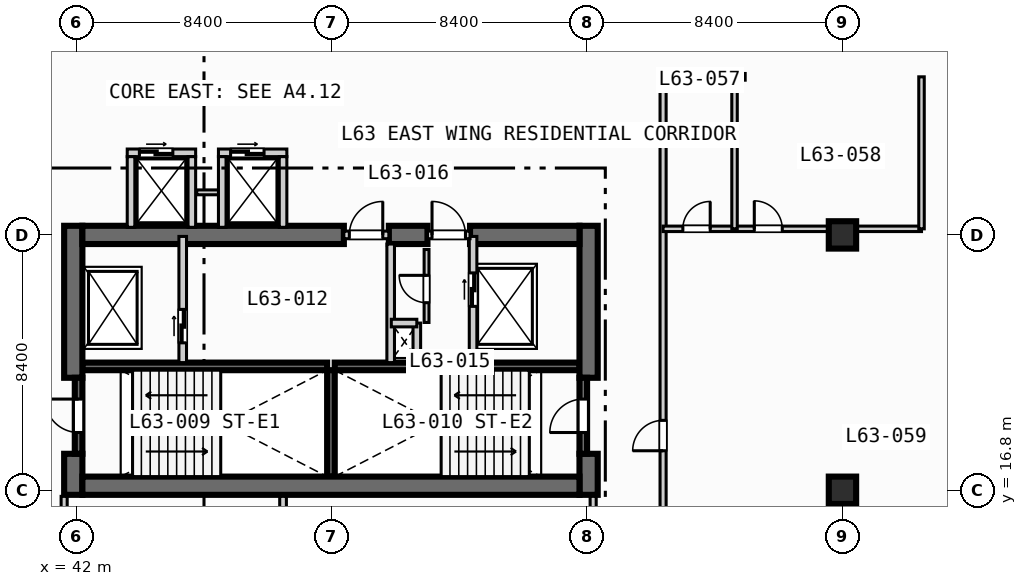
"""IFC4 building model, lengths in metres.
Left out: names, types, materials, properties, quantities, classifications, styles, units other than length and angle.
Written with IfcOpenShell. Run it as: python <this file> out.ifc"""

import sys

from ifc_helpers import new_model, si_unit, direction, frame, frame_2d, origin, origin_2d, place, context, subcontext, project, spatial, rectangle, extrude, element, fill, save


model = new_model("IFC4")
c1 = context("Model", 3, precision=1e-05, world=origin(), true_north=direction((0.0, 1.0)))
c2 = subcontext(c1, "Body", "Model", "MODEL_VIEW")
j1 = project(units=[si_unit("LENGTHUNIT", "METRE"), si_unit("PLANEANGLEUNIT", "RADIAN")], contexts=[c1])
p1 = place(None, origin())
s1 = spatial("IfcSite", under=j1, at=p1, CompositionType="ELEMENT")
p2 = place(p1, origin())
s2 = spatial("IfcBuilding", under=s1, at=p2, CompositionType="ELEMENT")
p3 = place(p2, frame((0.0, 0.0, 256.4)))
s3 = spatial("IfcBuildingStorey", under=s2, at=p3, CompositionType="ELEMENT", Elevation=256.4)
for number, where, z_axis, x_axis in (
    (1, (42.2, 20.875, 0.0), (0.0, 0.0, 1.0), (1.0, 0.0, 0.0)),
    (2, (50.5, 20.875, 0.0), (0.0, 0.0, 1.0), (1.0, 0.0, 0.0)),
):
    element("IfcWall", number, at=place(p3, frame(where, z_axis=z_axis, x_axis=x_axis)), inside=s3, PredefinedType="SOLIDWALL", context=c2, shape_type="SweptSolid", body=[
        extrude(rectangle(XDim=8.05, YDim=0.25, at=frame_2d((4.025, 0.0))), origin(), (0.0, 0.0, 1.0), 3.47),
    ])
p4 = place(p3, frame((50.375, 17.25, 0.0), z_axis=(0.0, 0.0, 1.0), x_axis=(0.0, 1.0, 0.0)))
e3 = element("IfcWall", 3, at=p4, inside=s3, PredefinedType="SOLIDWALL", context=c2, shape_type="SweptSolid", body=[
    extrude(rectangle(XDim=3.5, YDim=0.25, at=frame_2d((1.75, 0.0))), origin(), (0.0, 0.0, 1.0), 3.47),
])
p5 = place(p3, frame((41.9, 16.65, 0.0), z_axis=(0.0, 0.0, 1.0), x_axis=(0.0, 1.0, 0.0)))
e4 = element("IfcWall", 4, at=p5, inside=s3, PredefinedType="SHEAR", context=c2, shape_type="SweptSolid", body=[
    extrude(rectangle(XDim=1.35, YDim=0.6, at=frame_2d((0.675, 0.0))), origin(), (0.0, 0.0, 1.0), 3.47),
])
p6 = place(p3, frame((41.9, 20.5, 0.0), z_axis=(0.0, 0.0, 1.0), x_axis=(0.0, 1.0, 0.0)))
e5 = element("IfcWall", 5, at=p6, inside=s3, PredefinedType="SHEAR", context=c2, shape_type="SweptSolid", body=[
    extrude(rectangle(XDim=5.0, YDim=0.6, at=frame_2d((2.5, 0.0))), origin(), (0.0, 0.0, 1.0), 3.47),
])
p7 = place(p3, frame((58.85, 16.65, 0.0), z_axis=(0.0, 0.0, 1.0), x_axis=(0.0, 1.0, 0.0)))
e6 = element("IfcWall", 6, at=p7, inside=s3, PredefinedType="SHEAR", context=c2, shape_type="SweptSolid", body=[
    extrude(rectangle(XDim=1.35, YDim=0.6, at=frame_2d((0.675, 0.0))), origin(), (0.0, 0.0, 1.0), 3.47),
])
p8 = place(p3, frame((58.85, 20.5, 0.0), z_axis=(0.0, 0.0, 1.0), x_axis=(0.0, 1.0, 0.0)))
e7 = element("IfcWall", 7, at=p8, inside=s3, PredefinedType="SHEAR", context=c2, shape_type="SweptSolid", body=[
    extrude(rectangle(XDim=5.0, YDim=0.6, at=frame_2d((2.5, 0.0))), origin(), (0.0, 0.0, 1.0), 3.47),
])
p9 = place(p3, frame((42.2, 16.95, 0.0), z_axis=(0.0, 0.0, 1.0), x_axis=(1.0, 0.0, 0.0)))
e8 = element("IfcWall", 8, at=p9, inside=s3, PredefinedType="SHEAR", context=c2, shape_type="SweptSolid", body=[
    extrude(rectangle(XDim=16.35, YDim=0.6, at=frame_2d((8.175, 0.0))), origin(), (0.0, 0.0, 1.0), 3.47),
])
p10 = place(p3, frame((42.2, 25.2, 0.0), z_axis=(0.0, 0.0, 1.0), x_axis=(1.0, 0.0, 0.0)))
e9 = element("IfcWall", 9, at=p10, inside=s3, PredefinedType="SHEAR", context=c2, shape_type="SweptSolid", body=[
    extrude(rectangle(XDim=8.6, YDim=0.6, at=frame_2d((4.3, 0.0))), origin(), (0.0, 0.0, 1.0), 3.47),
])
p11 = place(p3, frame((52.28, 25.2, 0.0), z_axis=(0.0, 0.0, 1.0), x_axis=(1.0, 0.0, 0.0)))
e10 = element("IfcWall", 10, at=p11, inside=s3, PredefinedType="SHEAR", context=c2, shape_type="SweptSolid", body=[
    extrude(rectangle(XDim=1.27, YDim=0.6, at=frame_2d((0.635, 0.0))), origin(), (0.0, 0.0, 1.0), 3.47),
])
p12 = place(p3, frame((54.95, 25.2, 0.0), z_axis=(0.0, 0.0, 1.0), x_axis=(1.0, 0.0, 0.0)))
e11 = element("IfcWall", 11, at=p12, inside=s3, PredefinedType="SHEAR", context=c2, shape_type="SweptSolid", body=[
    extrude(rectangle(XDim=3.6, YDim=0.6, at=frame_2d((1.8, 0.0))), origin(), (0.0, 0.0, 1.0), 3.47),
])
for number, where, z_axis, x_axis in (
    (12, (67.2, 16.8, 0.0), (0.0, 0.0, 1.0), (1.0, 0.0, 0.0)),
    (13, (67.2, 25.2, 0.0), (0.0, 0.0, 1.0), (1.0, 0.0, 0.0)),
):
    element("IfcColumn", number, at=place(p3, frame(where, z_axis=z_axis, x_axis=x_axis)), inside=s3, PredefinedType="COLUMN", context=c2, shape_type="SweptSolid", body=[
        extrude(rectangle(XDim=0.9, YDim=0.9, at=origin_2d()), origin(), (0.0, 0.0, 1.0), 3.7),
    ])
p13 = place(p3, frame((42.075, 18.0, 0.0), z_axis=(0.0, 0.0, 1.0), x_axis=(0.0, 1.0, 0.0)))
e14 = element("IfcWall", 14, at=p13, inside=s3, PredefinedType="SOLIDWALL", context=c2, shape_type="SweptSolid", body=[
    extrude(rectangle(XDim=2.5, YDim=0.25, at=frame_2d((1.25, 0.0))), origin(), (0.0, 0.0, 1.0), 3.47),
])
p14 = place(p13, frame((0.7, 0.0, 0.0)))
e15 = element("IfcOpeningElement", 15, at=p14, cuts=e14, PredefinedType="OPENING", context=c2, shape_type="SweptSolid", body=[
    extrude(rectangle(XDim=1.1, YDim=2.15, at=frame_2d((0.55, 1.075))), frame((0.0, 0.135, 0.0), z_axis=(0.0, -1.0, 0.0), x_axis=(1.0, 0.0, 0.0)), (0.0, 0.0, 1.0), 0.27),
])
p15 = place(p3, frame((58.675, 18.0, 0.0), z_axis=(0.0, 0.0, 1.0), x_axis=(0.0, 1.0, 0.0)))
e16 = element("IfcWall", 16, at=p15, inside=s3, PredefinedType="SOLIDWALL", context=c2, shape_type="SweptSolid", body=[
    extrude(rectangle(XDim=2.5, YDim=0.25, at=frame_2d((1.25, 0.0))), origin(), (0.0, 0.0, 1.0), 3.47),
])
p16 = place(p15, frame((0.7, 0.0, 0.0)))
e17 = element("IfcOpeningElement", 17, at=p16, cuts=e16, PredefinedType="OPENING", context=c2, shape_type="SweptSolid", body=[
    extrude(rectangle(XDim=1.1, YDim=2.15, at=frame_2d((0.55, 1.075))), frame((0.0, 0.135, 0.0), z_axis=(0.0, -1.0, 0.0), x_axis=(1.0, 0.0, 0.0)), (0.0, 0.0, 1.0), 0.27),
])
p17 = place(p3, frame((45.5, 21.0, 0.0), z_axis=(0.0, 0.0, 1.0), x_axis=(0.0, 1.0, 0.0)))
e18 = element("IfcWall", 18, at=p17, inside=s3, PredefinedType="SOLIDWALL", context=c2, shape_type="SweptSolid", body=[
    extrude(rectangle(XDim=4.15, YDim=0.25, at=frame_2d((2.075, 0.0))), origin(), (0.0, 0.0, 1.0), 3.47),
])
p18 = place(p17, frame((0.65, 0.0, 0.0)))
e19 = element("IfcOpeningElement", 19, at=p18, cuts=e18, PredefinedType="OPENING", context=c2, shape_type="SweptSolid", body=[
    extrude(rectangle(XDim=1.1, YDim=2.15, at=frame_2d((0.55, 1.075))), frame((0.0, 0.135, 0.0), z_axis=(0.0, -1.0, 0.0), x_axis=(1.0, 0.0, 0.0)), (0.0, 0.0, 1.0), 0.27),
])
p19 = place(p3, frame((50.8, 25.2, 0.0), z_axis=(0.0, 0.0, 1.0), x_axis=(1.0, 0.0, 0.0)))
e20 = element("IfcWall", 20, at=p19, inside=s3, PredefinedType="SOLIDWALL", context=c2, shape_type="SweptSolid", body=[
    extrude(rectangle(XDim=1.48, YDim=0.25, at=frame_2d((0.74, 0.0))), origin(), (0.0, 0.0, 1.0), 3.47),
])
p20 = place(p19, frame((0.18, 0.0, 0.0)))
e21 = element("IfcOpeningElement", 21, at=p20, cuts=e20, PredefinedType="OPENING", context=c2, shape_type="SweptSolid", body=[
    extrude(rectangle(XDim=1.1, YDim=2.15, at=frame_2d((0.55, 1.075))), frame((0.0, 0.135, 0.0), z_axis=(0.0, -1.0, 0.0), x_axis=(1.0, 0.0, 0.0)), (0.0, 0.0, 1.0), 0.27),
])
p21 = place(p3, frame((52.34, 21.0, 0.0), z_axis=(0.0, 0.0, 1.0), x_axis=(0.0, 1.0, 0.0)))
e22 = element("IfcWall", 22, at=p21, inside=s3, PredefinedType="SOLIDWALL", context=c2, shape_type="SweptSolid", body=[
    extrude(rectangle(XDim=3.9, YDim=0.25, at=frame_2d((1.95, 0.0))), origin(), (0.0, 0.0, 1.0), 3.47),
])
p22 = place(p3, frame((55.05, 21.0, 0.0), z_axis=(0.0, 0.0, 1.0), x_axis=(0.0, 1.0, 0.0)))
e23 = element("IfcWall", 23, at=p22, inside=s3, PredefinedType="SOLIDWALL", context=c2, shape_type="SweptSolid", body=[
    extrude(rectangle(XDim=4.15, YDim=0.25, at=frame_2d((2.075, 0.0))), origin(), (0.0, 0.0, 1.0), 3.47),
])
p23 = place(p22, frame((1.85, 0.0, 0.0)))
e24 = element("IfcOpeningElement", 24, at=p23, cuts=e23, PredefinedType="OPENING", context=c2, shape_type="SweptSolid", body=[
    extrude(rectangle(XDim=1.1, YDim=2.15, at=frame_2d((0.55, 1.075))), frame((0.0, 0.135, 0.0), z_axis=(0.0, -1.0, 0.0), x_axis=(1.0, 0.0, 0.0)), (0.0, 0.0, 1.0), 0.27),
])
p24 = place(p3, frame((53.55, 25.2, 0.0), z_axis=(0.0, 0.0, 1.0), x_axis=(1.0, 0.0, 0.0)))
e25 = element("IfcWall", 25, at=p24, inside=s3, PredefinedType="SOLIDWALL", context=c2, shape_type="SweptSolid", body=[
    extrude(rectangle(XDim=1.4, YDim=0.25, at=frame_2d((0.7, 0.0))), origin(), (0.0, 0.0, 1.0), 3.47),
])
p25 = place(p24, frame((0.15, 0.0, 0.0)))
e26 = element("IfcOpeningElement", 26, at=p25, cuts=e25, PredefinedType="OPENING", context=c2, shape_type="SweptSolid", body=[
    extrude(rectangle(XDim=1.1, YDim=2.15, at=frame_2d((0.55, 1.075))), frame((0.0, 0.135, 0.0), z_axis=(0.0, -1.0, 0.0), x_axis=(1.0, 0.0, 0.0)), (0.0, 0.0, 1.0), 0.27),
])
p26 = place(p3, frame((53.2, 21.0, 0.0), z_axis=(0.0, 0.0, 1.0), x_axis=(0.0, 1.0, 0.0)))
e27 = element("IfcWall", 27, at=p26, inside=s3, PredefinedType="SOLIDWALL", context=c2, shape_type="SweptSolid", body=[
    extrude(rectangle(XDim=1.3, YDim=0.25, at=frame_2d((0.65, 0.0))), origin(), (0.0, 0.0, 1.0), 3.47),
])
p27 = place(p3, frame((52.36, 22.3, 0.0), z_axis=(0.0, 0.0, 1.0), x_axis=(1.0, 0.0, 0.0)))
e28 = element("IfcWall", 28, at=p27, inside=s3, PredefinedType="SOLIDWALL", context=c2, shape_type="SweptSolid", body=[
    extrude(rectangle(XDim=0.84, YDim=0.25, at=frame_2d((0.42, 0.0))), origin(), (0.0, 0.0, 1.0), 3.47),
])
p28 = place(p3, frame((53.52, 22.32, 0.0), z_axis=(0.0, 0.0, 1.0), x_axis=(0.0, 1.0, 0.0)))
e29 = element("IfcWall", 29, at=p28, inside=s3, PredefinedType="PARTITIONING", context=c2, shape_type="SweptSolid", body=[
    extrude(rectangle(XDim=2.4, YDim=0.16, at=frame_2d((1.2, 0.0))), origin(), (0.0, 0.0, 1.0), 3.47),
])
p29 = place(p28, frame((0.65, 0.0, 0.0)))
e30 = element("IfcOpeningElement", 30, at=p29, cuts=e29, PredefinedType="OPENING", context=c2, shape_type="SweptSolid", body=[
    extrude(rectangle(XDim=0.9, YDim=2.1, at=frame_2d((0.45, 1.05))), frame((0.0, 0.09, 0.0), z_axis=(0.0, -1.0, 0.0), x_axis=(1.0, 0.0, 0.0)), (0.0, 0.0, 1.0), 0.18),
])
p30 = place(p3, frame((43.675, 27.9, 0.0), z_axis=(0.0, 0.0, 1.0), x_axis=(1.0, 0.0, 0.0)))
e31 = element("IfcWall", 31, at=p30, inside=s3, PredefinedType="SOLIDWALL", context=c2, shape_type="SweptSolid", body=[
    extrude(rectangle(XDim=2.25, YDim=0.25, at=frame_2d((1.125, 0.0))), origin(), (0.0, 0.0, 1.0), 3.47),
])
p31 = place(p30, frame((0.4, 0.0, 0.0)))
e32 = element("IfcOpeningElement", 32, at=p31, cuts=e31, PredefinedType="OPENING", context=c2, shape_type="SweptSolid", body=[
    extrude(rectangle(XDim=1.1, YDim=2.15, at=frame_2d((0.55, 1.075))), frame((0.0, 0.135, 0.0), z_axis=(0.0, -1.0, 0.0), x_axis=(1.0, 0.0, 0.0)), (0.0, 0.0, 1.0), 0.27),
])
for number, where, z_axis, x_axis in (
    (33, (43.8, 25.45, 0.0), (0.0, 0.0, 1.0), (0.0, 1.0, 0.0)),
    (34, (45.8, 25.45, 0.0), (0.0, 0.0, 1.0), (0.0, 1.0, 0.0)),
):
    element("IfcWall", number, at=place(p3, frame(where, z_axis=z_axis, x_axis=x_axis)), inside=s3, PredefinedType="SOLIDWALL", context=c2, shape_type="SweptSolid", body=[
        extrude(rectangle(XDim=2.325, YDim=0.25, at=frame_2d((1.163, 0.0))), origin(), (0.0, 0.0, 1.0), 3.47),
    ])
p32 = place(p3, frame((45.96, 26.6, 0.0), z_axis=(0.0, 0.0, 1.0), x_axis=(1.0, 0.0, 0.0)))
e35 = element("IfcWall", 35, at=p32, inside=s3, PredefinedType="PARTITIONING", context=c2, shape_type="SweptSolid", body=[
    extrude(rectangle(XDim=0.88, YDim=0.16, at=frame_2d((0.44, 0.0))), origin(), (0.0, 0.0, 1.0), 3.47),
])
p33 = place(p3, frame((46.675, 27.9, 0.0), z_axis=(0.0, 0.0, 1.0), x_axis=(1.0, 0.0, 0.0)))
e36 = element("IfcWall", 36, at=p33, inside=s3, PredefinedType="SOLIDWALL", context=c2, shape_type="SweptSolid", body=[
    extrude(rectangle(XDim=2.25, YDim=0.25, at=frame_2d((1.125, 0.0))), origin(), (0.0, 0.0, 1.0), 3.47),
])
p34 = place(p33, frame((0.4, 0.0, 0.0)))
e37 = element("IfcOpeningElement", 37, at=p34, cuts=e36, PredefinedType="OPENING", context=c2, shape_type="SweptSolid", body=[
    extrude(rectangle(XDim=1.1, YDim=2.15, at=frame_2d((0.55, 1.075))), frame((0.0, 0.135, 0.0), z_axis=(0.0, -1.0, 0.0), x_axis=(1.0, 0.0, 0.0)), (0.0, 0.0, 1.0), 0.27),
])
for number, where, z_axis, x_axis in (
    (38, (46.8, 25.45, 0.0), (0.0, 0.0, 1.0), (0.0, 1.0, 0.0)),
    (39, (48.8, 25.45, 0.0), (0.0, 0.0, 1.0), (0.0, 1.0, 0.0)),
):
    element("IfcWall", number, at=place(p3, frame(where, z_axis=z_axis, x_axis=x_axis)), inside=s3, PredefinedType="SOLIDWALL", context=c2, shape_type="SweptSolid", body=[
        extrude(rectangle(XDim=2.325, YDim=0.25, at=frame_2d((1.163, 0.0))), origin(), (0.0, 0.0, 1.0), 3.47),
    ])
p35 = place(p3, frame((41.6, 8.65, 0.0), z_axis=(0.0, 0.0, 1.0), x_axis=(0.0, 1.0, 0.0)))
e40 = element("IfcWall", 40, at=p35, inside=s3, PredefinedType="PARTITIONING", context=c2, shape_type="SweptSolid", body=[
    extrude(rectangle(XDim=7.95, YDim=0.2, at=frame_2d((3.975, 0.0))), origin(), (0.0, 0.0, 1.0), 3.47),
])
p36 = place(p35, frame((2.2, 0.0, 0.0)))
e41 = element("IfcOpeningElement", 41, at=p36, cuts=e40, PredefinedType="OPENING", context=c2, shape_type="SweptSolid", body=[
    extrude(rectangle(XDim=0.92, YDim=2.1, at=frame_2d((0.46, 1.05))), frame((0.0, 0.11, 0.0), z_axis=(0.0, -1.0, 0.0), x_axis=(1.0, 0.0, 0.0)), (0.0, 0.0, 1.0), 0.22),
])
p37 = place(p3, frame((59.0, 8.65, 0.0), z_axis=(0.0, 0.0, 1.0), x_axis=(0.0, 1.0, 0.0)))
e42 = element("IfcWall", 42, at=p37, inside=s3, PredefinedType="PARTITIONING", context=c2, shape_type="SweptSolid", body=[
    extrude(rectangle(XDim=7.95, YDim=0.2, at=frame_2d((3.975, 0.0))), origin(), (0.0, 0.0, 1.0), 2.82),
])
p38 = place(p37, frame((2.2, 0.0, 0.0)))
e43 = element("IfcOpeningElement", 43, at=p38, cuts=e42, PredefinedType="OPENING", context=c2, shape_type="SweptSolid", body=[
    extrude(rectangle(XDim=0.92, YDim=2.1, at=frame_2d((0.46, 1.05))), frame((0.0, 0.11, 0.0), z_axis=(0.0, -1.0, 0.0), x_axis=(1.0, 0.0, 0.0)), (0.0, 0.0, 1.0), 0.22),
])
p39 = place(p3, frame((48.8, 8.65, 0.0), z_axis=(0.0, 0.0, 1.0), x_axis=(0.0, 1.0, 0.0)))
e44 = element("IfcWall", 44, at=p39, inside=s3, PredefinedType="PARTITIONING", context=c2, shape_type="SweptSolid", body=[
    extrude(rectangle(XDim=7.95, YDim=0.22, at=frame_2d((3.975, 0.0))), origin(), (0.0, 0.0, 1.0), 3.47),
])
p40 = place(p3, frame((61.3, 11.6, 0.0), z_axis=(0.0, 0.0, 1.0), x_axis=(0.0, 1.0, 0.0)))
e45 = element("IfcWall", 45, at=p40, inside=s3, PredefinedType="PARTITIONING", context=c2, shape_type="SweptSolid", body=[
    extrude(rectangle(XDim=18.8, YDim=0.2, at=frame_2d((9.4, 0.0))), origin(), (0.0, 0.0, 1.0), 3.47),
])
p41 = place(p40, frame((6.5, 0.0, 0.0)))
e46 = element("IfcOpeningElement", 46, at=p41, cuts=e45, PredefinedType="OPENING", context=c2, shape_type="SweptSolid", body=[
    extrude(rectangle(XDim=1.0, YDim=2.15, at=frame_2d((0.5, 1.075))), frame((0.0, 0.11, 0.0), z_axis=(0.0, -1.0, 0.0), x_axis=(1.0, 0.0, 0.0)), (0.0, 0.0, 1.0), 0.22),
])
p42 = place(p3, frame((61.3, 25.4, 0.0), z_axis=(0.0, 0.0, 1.0), x_axis=(1.0, 0.0, 0.0)))
e47 = element("IfcWall", 47, at=p42, inside=s3, PredefinedType="PLUMBINGWALL", context=c2, shape_type="SweptSolid", body=[
    extrude(rectangle(XDim=8.5, YDim=0.18, at=frame_2d((4.25, 0.0))), origin(), (0.0, 0.0, 1.0), 2.82),
])
p43 = place(p42, frame((0.65, 0.0, 0.0)))
e48 = element("IfcOpeningElement", 48, at=p43, cuts=e47, PredefinedType="OPENING", context=c2, shape_type="SweptSolid", body=[
    extrude(rectangle(XDim=0.9, YDim=2.1, at=frame_2d((0.45, 1.05))), frame((0.0, 0.1, 0.0), z_axis=(0.0, -1.0, 0.0), x_axis=(1.0, 0.0, 0.0)), (0.0, 0.0, 1.0), 0.2),
])
p44 = place(p42, frame((3.0, 0.0, 0.0)))
e49 = element("IfcOpeningElement", 49, at=p44, cuts=e47, PredefinedType="OPENING", context=c2, shape_type="SweptSolid", body=[
    extrude(rectangle(XDim=0.92, YDim=2.1, at=frame_2d((0.46, 1.05))), frame((0.0, 0.1, 0.0), z_axis=(0.0, -1.0, 0.0), x_axis=(1.0, 0.0, 0.0)), (0.0, 0.0, 1.0), 0.2),
])
for number, where, z_axis, x_axis in (
    (50, (63.65, 25.4, 0.0), (0.0, 0.0, 1.0), (0.0, 1.0, 0.0)),
    (51, (69.8, 25.4, 0.0), (0.0, 0.0, 1.0), (0.0, 1.0, 0.0)),
):
    element("IfcWall", number, at=place(p3, frame(where, z_axis=z_axis, x_axis=x_axis)), inside=s3, PredefinedType="PLUMBINGWALL", context=c2, shape_type="SweptSolid", body=[
        extrude(rectangle(XDim=5.0, YDim=0.18, at=frame_2d((2.5, 0.0))), origin(), (0.0, 0.0, 1.0), 3.47),
    ])
p45 = place(p3, frame((61.3, 30.4, 0.0), z_axis=(0.0, 0.0, 1.0), x_axis=(1.0, 0.0, 0.0)))
e52 = element("IfcWall", 52, at=p45, inside=s3, PredefinedType="PARTITIONING", context=c2, shape_type="SweptSolid", body=[
    extrude(rectangle(XDim=2.7, YDim=0.22, at=frame_2d((1.35, 0.0))), origin(), (0.0, 0.0, 1.0), 3.47),
])
p46 = place(p14, origin())
e53 = element("IfcDoor", 53, at=p46, inside=s3, OperationType="SINGLE_SWING_RIGHT", PredefinedType="DOOR", context=c2, shape_type="SweptSolid", body=[
    extrude(rectangle(XDim=1.1, YDim=2.15, at=frame_2d((0.55, 1.075))), frame((0.0, 0.025, 0.0), z_axis=(0.0, -1.0, 0.0), x_axis=(1.0, 0.0, 0.0)), (0.0, 0.0, 1.0), 0.05),
])
fill(e15, e53)
p47 = place(p16, origin())
e54 = element("IfcDoor", 54, at=p47, inside=s3, OperationType="SINGLE_SWING_LEFT", PredefinedType="DOOR", context=c2, shape_type="SweptSolid", body=[
    extrude(rectangle(XDim=1.1, YDim=2.15, at=frame_2d((0.55, 1.075))), frame((0.0, 0.025, 0.0), z_axis=(0.0, -1.0, 0.0), x_axis=(1.0, 0.0, 0.0)), (0.0, 0.0, 1.0), 0.05),
])
fill(e17, e54)
p48 = place(p18, origin())
e55 = element("IfcDoor", 55, at=p48, inside=s3, OperationType="SLIDING_TO_LEFT", PredefinedType="DOOR", context=c2, shape_type="SweptSolid", body=[
    extrude(rectangle(XDim=1.1, YDim=2.15, at=frame_2d((0.55, 1.075))), frame((0.0, 0.025, 0.0), z_axis=(0.0, -1.0, 0.0), x_axis=(1.0, 0.0, 0.0)), (0.0, 0.0, 1.0), 0.05),
])
fill(e19, e55)
p49 = place(p20, origin())
e56 = element("IfcDoor", 56, at=p49, inside=s3, OperationType="SINGLE_SWING_RIGHT", PredefinedType="DOOR", context=c2, shape_type="SweptSolid", body=[
    extrude(rectangle(XDim=1.1, YDim=2.15, at=frame_2d((0.55, 1.075))), frame((0.0, 0.025, 0.0), z_axis=(0.0, -1.0, 0.0), x_axis=(1.0, 0.0, 0.0)), (0.0, 0.0, 1.0), 0.05),
])
fill(e21, e56)
p50 = place(p23, origin())
e57 = element("IfcDoor", 57, at=p50, inside=s3, OperationType="SLIDING_TO_LEFT", PredefinedType="DOOR", context=c2, shape_type="SweptSolid", body=[
    extrude(rectangle(XDim=1.1, YDim=2.15, at=frame_2d((0.55, 1.075))), frame((0.0, 0.025, 0.0), z_axis=(0.0, -1.0, 0.0), x_axis=(1.0, 0.0, 0.0)), (0.0, 0.0, 1.0), 0.05),
])
fill(e24, e57)
p51 = place(p25, origin())
e58 = element("IfcDoor", 58, at=p51, inside=s3, OperationType="SINGLE_SWING_LEFT", PredefinedType="DOOR", context=c2, shape_type="SweptSolid", body=[
    extrude(rectangle(XDim=1.1, YDim=2.15, at=frame_2d((0.55, 1.075))), frame((0.0, 0.025, 0.0), z_axis=(0.0, -1.0, 0.0), x_axis=(1.0, 0.0, 0.0)), (0.0, 0.0, 1.0), 0.05),
])
fill(e26, e58)
p52 = place(p29, origin())
e59 = element("IfcDoor", 59, at=p52, inside=s3, OperationType="SINGLE_SWING_RIGHT", PredefinedType="DOOR", context=c2, shape_type="SweptSolid", body=[
    extrude(rectangle(XDim=0.9, YDim=2.1, at=frame_2d((0.45, 1.05))), frame((0.0, 0.025, 0.0), z_axis=(0.0, -1.0, 0.0), x_axis=(1.0, 0.0, 0.0)), (0.0, 0.0, 1.0), 0.05),
])
fill(e30, e59)
p53 = place(p31, origin())
e60 = element("IfcDoor", 60, at=p53, inside=s3, OperationType="SLIDING_TO_LEFT", PredefinedType="DOOR", context=c2, shape_type="SweptSolid", body=[
    extrude(rectangle(XDim=1.1, YDim=2.15, at=frame_2d((0.55, 1.075))), frame((0.0, 0.025, 0.0), z_axis=(0.0, -1.0, 0.0), x_axis=(1.0, 0.0, 0.0)), (0.0, 0.0, 1.0), 0.05),
])
fill(e32, e60)
p54 = place(p34, origin())
e61 = element("IfcDoor", 61, at=p54, inside=s3, OperationType="SLIDING_TO_LEFT", PredefinedType="DOOR", context=c2, shape_type="SweptSolid", body=[
    extrude(rectangle(XDim=1.1, YDim=2.15, at=frame_2d((0.55, 1.075))), frame((0.0, 0.025, 0.0), z_axis=(0.0, -1.0, 0.0), x_axis=(1.0, 0.0, 0.0)), (0.0, 0.0, 1.0), 0.05),
])
fill(e37, e61)
p55 = place(p41, origin())
e62 = element("IfcDoor", 62, at=p55, inside=s3, OperationType="SINGLE_SWING_LEFT", PredefinedType="DOOR", context=c2, shape_type="SweptSolid", body=[
    extrude(rectangle(XDim=1.0, YDim=2.15, at=frame_2d((0.5, 1.075))), frame((0.0, 0.025, 0.0), z_axis=(0.0, -1.0, 0.0), x_axis=(1.0, 0.0, 0.0)), (0.0, 0.0, 1.0), 0.05),
])
fill(e46, e62)
p56 = place(p43, origin())
e63 = element("IfcDoor", 63, at=p56, inside=s3, OperationType="SINGLE_SWING_RIGHT", PredefinedType="DOOR", context=c2, shape_type="SweptSolid", body=[
    extrude(rectangle(XDim=0.9, YDim=2.1, at=frame_2d((0.45, 1.05))), frame((0.0, 0.025, 0.0), z_axis=(0.0, -1.0, 0.0), x_axis=(1.0, 0.0, 0.0)), (0.0, 0.0, 1.0), 0.05),
])
fill(e48, e63)
p57 = place(p44, origin())
e64 = element("IfcDoor", 64, at=p57, inside=s3, OperationType="SINGLE_SWING_LEFT", PredefinedType="DOOR", context=c2, shape_type="SweptSolid", body=[
    extrude(rectangle(XDim=0.92, YDim=2.1, at=frame_2d((0.46, 1.05))), frame((0.0, 0.025, 0.0), z_axis=(0.0, -1.0, 0.0), x_axis=(1.0, 0.0, 0.0)), (0.0, 0.0, 1.0), 0.05),
])
fill(e49, e64)
save(model, sys.argv[1])
